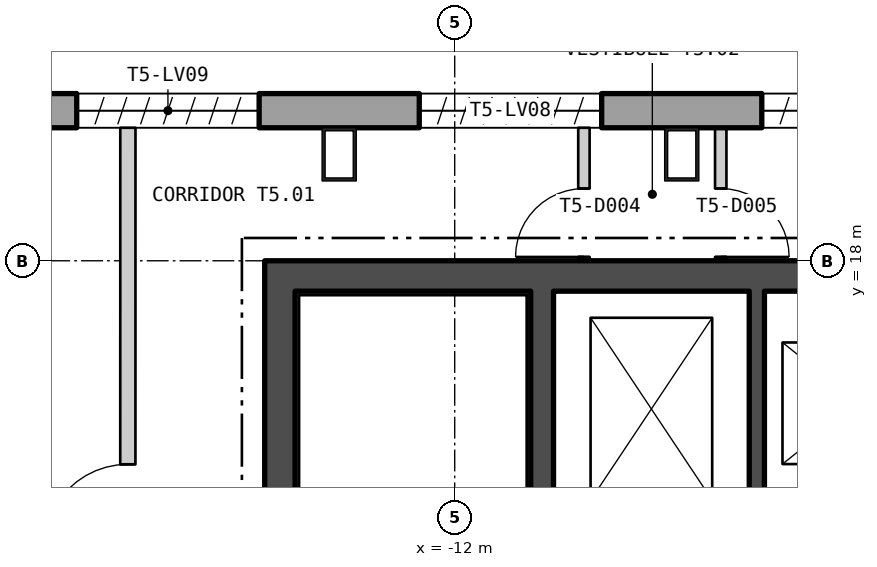
"""IFC4 building model, lengths in metres.
Left out: names, types, materials, properties, quantities, classifications, styles, units other than length and angle.
Written with IfcOpenShell. Run it as: python <this file> out.ifc"""

import sys

from ifc_helpers import new_model, si_unit, direction, frame, frame_2d, origin, origin_2d, place, context, subcontext, project, spatial, polyline, rectangle, hollow_rectangle, outline, extrude, element, fill, save


model = new_model("IFC4")
c1 = context("Model", 3, precision=1e-05, world=origin(), true_north=direction((0.0, 1.0)))
c2 = subcontext(c1, "Body", "Model", "MODEL_VIEW")
j1 = project(units=[si_unit("LENGTHUNIT", "METRE"), si_unit("PLANEANGLEUNIT", "RADIAN")], contexts=[c1])
p1 = place(None, origin())
s1 = spatial("IfcSite", under=j1, at=p1, CompositionType="ELEMENT")
p2 = place(p1, origin())
s2 = spatial("IfcBuilding", under=s1, at=p2, CompositionType="ELEMENT")
p3 = place(p2, frame((0.0, 0.0, 292.2)))
s3 = spatial("IfcBuildingStorey", under=s2, at=p3, CompositionType="ELEMENT", Elevation=292.2)
for number, where, z_axis, x_axis in (
    (1, (-9.013, 19.4, 0.0), (0.0, 0.0, 1.0), (-1.0, 0.0, 0.0)),
    (2, (-13.52, 19.4, 0.0), (0.0, 0.0, 1.0), (-1.0, 0.0, 0.0)),
):
    element("IfcColumn", number, at=place(p3, frame(where, z_axis=z_axis, x_axis=x_axis)), inside=s3, PredefinedType="COLUMN", context=c2, shape_type="SweptSolid", body=[
        extrude(hollow_rectangle(XDim=0.45, YDim=0.7, WallThickness=0.04, at=origin_2d()), origin(), (0.0, 0.0, 1.0), 6.0),
    ])
p4 = place(p3, frame((22.865, 19.975, -0.4), z_axis=(0.0, 0.0, 1.0), x_axis=(-1.0, 0.0, 0.0)))
e3 = element("IfcWall", 3, at=p4, inside=s3, PredefinedType="SOLIDWALL", context=c2, shape_type="SweptSolid", body=[
    extrude(outline(polyline([(-0.13, -0.225), (45.86, -0.225), (45.6, 0.225), (0.13, 0.225), (-0.13, -0.225)])), origin(), (0.0, 0.0, 1.0), 6.0),
])
p5 = place(p4, frame((1.424, 0.0, 1.6)))
e4 = element("IfcOpeningElement", 4, at=p5, cuts=e3, PredefinedType="OPENING", context=c2, shape_type="SweptSolid", body=[
    extrude(rectangle(XDim=2.4, YDim=3.6, at=frame_2d((1.2, 1.8))), frame((0.0, 0.235, 0.0), z_axis=(0.0, -1.0, 0.0), x_axis=(1.0, 0.0, 0.0)), (0.0, 0.0, 1.0), 0.47),
])
p6 = place(p4, frame((5.892, 0.0, 1.6)))
e5 = element("IfcOpeningElement", 5, at=p6, cuts=e3, PredefinedType="OPENING", context=c2, shape_type="SweptSolid", body=[
    extrude(rectangle(XDim=2.4, YDim=3.6, at=frame_2d((1.2, 1.8))), frame((0.0, 0.235, 0.0), z_axis=(0.0, -1.0, 0.0), x_axis=(1.0, 0.0, 0.0)), (0.0, 0.0, 1.0), 0.47),
])
p7 = place(p4, frame((10.399, 0.0, 1.6)))
e6 = element("IfcOpeningElement", 6, at=p7, cuts=e3, PredefinedType="OPENING", context=c2, shape_type="SweptSolid", body=[
    extrude(rectangle(XDim=2.4, YDim=3.6, at=frame_2d((1.2, 1.8))), frame((0.0, 0.235, 0.0), z_axis=(0.0, -1.0, 0.0), x_axis=(1.0, 0.0, 0.0)), (0.0, 0.0, 1.0), 0.47),
])
p8 = place(p4, frame((14.905, 0.0, 1.6)))
e7 = element("IfcOpeningElement", 7, at=p8, cuts=e3, PredefinedType="OPENING", context=c2, shape_type="SweptSolid", body=[
    extrude(rectangle(XDim=2.4, YDim=3.6, at=frame_2d((1.2, 1.8))), frame((0.0, 0.235, 0.0), z_axis=(0.0, -1.0, 0.0), x_axis=(1.0, 0.0, 0.0)), (0.0, 0.0, 1.0), 0.47),
])
p9 = place(p4, frame((19.412, 0.0, 1.6)))
e8 = element("IfcOpeningElement", 8, at=p9, cuts=e3, PredefinedType="OPENING", context=c2, shape_type="SweptSolid", body=[
    extrude(rectangle(XDim=2.4, YDim=3.6, at=frame_2d((1.2, 1.8))), frame((0.0, 0.235, 0.0), z_axis=(0.0, -1.0, 0.0), x_axis=(1.0, 0.0, 0.0)), (0.0, 0.0, 1.0), 0.47),
])
p10 = place(p4, frame((23.918, 0.0, 1.6)))
e9 = element("IfcOpeningElement", 9, at=p10, cuts=e3, PredefinedType="OPENING", context=c2, shape_type="SweptSolid", body=[
    extrude(rectangle(XDim=2.4, YDim=3.6, at=frame_2d((1.2, 1.8))), frame((0.0, 0.235, 0.0), z_axis=(0.0, -1.0, 0.0), x_axis=(1.0, 0.0, 0.0)), (0.0, 0.0, 1.0), 0.47),
])
p11 = place(p4, frame((28.425, 0.0, 1.6)))
e10 = element("IfcOpeningElement", 10, at=p11, cuts=e3, PredefinedType="OPENING", context=c2, shape_type="SweptSolid", body=[
    extrude(rectangle(XDim=2.4, YDim=3.6, at=frame_2d((1.2, 1.8))), frame((0.0, 0.235, 0.0), z_axis=(0.0, -1.0, 0.0), x_axis=(1.0, 0.0, 0.0)), (0.0, 0.0, 1.0), 0.47),
])
p12 = place(p4, frame((32.932, 0.0, 1.6)))
e11 = element("IfcOpeningElement", 11, at=p12, cuts=e3, PredefinedType="OPENING", context=c2, shape_type="SweptSolid", body=[
    extrude(rectangle(XDim=2.4, YDim=3.6, at=frame_2d((1.2, 1.8))), frame((0.0, 0.235, 0.0), z_axis=(0.0, -1.0, 0.0), x_axis=(1.0, 0.0, 0.0)), (0.0, 0.0, 1.0), 0.47),
])
p13 = place(p4, frame((37.438, 0.0, 1.6)))
e12 = element("IfcOpeningElement", 12, at=p13, cuts=e3, PredefinedType="OPENING", context=c2, shape_type="SweptSolid", body=[
    extrude(rectangle(XDim=2.4, YDim=3.6, at=frame_2d((1.2, 1.8))), frame((0.0, 0.235, 0.0), z_axis=(0.0, -1.0, 0.0), x_axis=(1.0, 0.0, 0.0)), (0.0, 0.0, 1.0), 0.47),
])
p14 = place(p4, frame((41.907, 0.0, 1.6)))
e13 = element("IfcOpeningElement", 13, at=p14, cuts=e3, PredefinedType="OPENING", context=c2, shape_type="SweptSolid", body=[
    extrude(rectangle(XDim=2.4, YDim=3.6, at=frame_2d((1.2, 1.8))), frame((0.0, 0.235, 0.0), z_axis=(0.0, -1.0, 0.0), x_axis=(1.0, 0.0, 0.0)), (0.0, 0.0, 1.0), 0.47),
])
p15 = place(p3, frame((-25.28, 15.792, -0.18), z_axis=(0.0, 0.0, 1.0), x_axis=(0.500000141277, -0.866025322218, 0.0)))
e14 = element("IfcWall", 14, at=p15, inside=s3, PredefinedType="SOLIDWALL", context=c2, shape_type="SweptSolid", body=[
    extrude(outline(polyline([(-0.13, -0.225), (45.86, -0.225), (45.6, 0.225), (0.13, 0.225), (-0.13, -0.225)])), origin(), (0.0, 0.0, 1.0), 5.9),
])
p16 = place(p15, frame((1.424, 0.0, 1.38)))
e15 = element("IfcOpeningElement", 15, at=p16, cuts=e14, PredefinedType="OPENING", context=c2, shape_type="SweptSolid", body=[
    extrude(rectangle(XDim=2.4, YDim=3.6, at=frame_2d((1.2, 1.8))), frame((0.0, 0.235, 0.0), z_axis=(0.0, -1.0, 0.0), x_axis=(1.0, 0.0, 0.0)), (0.0, 0.0, 1.0), 0.47),
])
p17 = place(p15, frame((5.892, 0.0, 1.38)))
e16 = element("IfcOpeningElement", 16, at=p17, cuts=e14, PredefinedType="OPENING", context=c2, shape_type="SweptSolid", body=[
    extrude(rectangle(XDim=2.4, YDim=3.6, at=frame_2d((1.2, 1.8))), frame((0.0, 0.235, 0.0), z_axis=(0.0, -1.0, 0.0), x_axis=(1.0, 0.0, 0.0)), (0.0, 0.0, 1.0), 0.47),
])
p18 = place(p15, frame((10.399, 0.0, 1.38)))
e17 = element("IfcOpeningElement", 17, at=p18, cuts=e14, PredefinedType="OPENING", context=c2, shape_type="SweptSolid", body=[
    extrude(rectangle(XDim=2.4, YDim=3.6, at=frame_2d((1.2, 1.8))), frame((0.0, 0.235, 0.0), z_axis=(0.0, -1.0, 0.0), x_axis=(1.0, 0.0, 0.0)), (0.0, 0.0, 1.0), 0.47),
])
p19 = place(p15, frame((14.905, 0.0, 1.38)))
e18 = element("IfcOpeningElement", 18, at=p19, cuts=e14, PredefinedType="OPENING", context=c2, shape_type="SweptSolid", body=[
    extrude(rectangle(XDim=2.4, YDim=3.6, at=frame_2d((1.2, 1.8))), frame((0.0, 0.235, 0.0), z_axis=(0.0, -1.0, 0.0), x_axis=(1.0, 0.0, 0.0)), (0.0, 0.0, 1.0), 0.47),
])
p20 = place(p15, frame((19.412, 0.0, 1.38)))
e19 = element("IfcOpeningElement", 19, at=p20, cuts=e14, PredefinedType="OPENING", context=c2, shape_type="SweptSolid", body=[
    extrude(rectangle(XDim=2.4, YDim=3.6, at=frame_2d((1.2, 1.8))), frame((0.0, 0.235, 0.0), z_axis=(0.0, -1.0, 0.0), x_axis=(1.0, 0.0, 0.0)), (0.0, 0.0, 1.0), 0.47),
])
p21 = place(p15, frame((23.918, 0.0, 1.38)))
e20 = element("IfcOpeningElement", 20, at=p21, cuts=e14, PredefinedType="OPENING", context=c2, shape_type="SweptSolid", body=[
    extrude(rectangle(XDim=2.4, YDim=3.6, at=frame_2d((1.2, 1.8))), frame((0.0, 0.235, 0.0), z_axis=(0.0, -1.0, 0.0), x_axis=(1.0, 0.0, 0.0)), (0.0, 0.0, 1.0), 0.47),
])
p22 = place(p15, frame((28.425, 0.0, 1.38)))
e21 = element("IfcOpeningElement", 21, at=p22, cuts=e14, PredefinedType="OPENING", context=c2, shape_type="SweptSolid", body=[
    extrude(rectangle(XDim=2.4, YDim=3.6, at=frame_2d((1.2, 1.8))), frame((0.0, 0.235, 0.0), z_axis=(0.0, -1.0, 0.0), x_axis=(1.0, 0.0, 0.0)), (0.0, 0.0, 1.0), 0.47),
])
p23 = place(p15, frame((32.932, 0.0, 1.38)))
e22 = element("IfcOpeningElement", 22, at=p23, cuts=e14, PredefinedType="OPENING", context=c2, shape_type="SweptSolid", body=[
    extrude(rectangle(XDim=2.4, YDim=3.6, at=frame_2d((1.2, 1.8))), frame((0.0, 0.235, 0.0), z_axis=(0.0, -1.0, 0.0), x_axis=(1.0, 0.0, 0.0)), (0.0, 0.0, 1.0), 0.47),
])
p24 = place(p15, frame((37.438, 0.0, 1.38)))
e23 = element("IfcOpeningElement", 23, at=p24, cuts=e14, PredefinedType="OPENING", context=c2, shape_type="SweptSolid", body=[
    extrude(rectangle(XDim=2.4, YDim=3.6, at=frame_2d((1.2, 1.8))), frame((0.0, 0.235, 0.0), z_axis=(0.0, -1.0, 0.0), x_axis=(1.0, 0.0, 0.0)), (0.0, 0.0, 1.0), 0.47),
])
p25 = place(p15, frame((41.907, 0.0, 1.38)))
e24 = element("IfcOpeningElement", 24, at=p25, cuts=e14, PredefinedType="OPENING", context=c2, shape_type="SweptSolid", body=[
    extrude(rectangle(XDim=2.4, YDim=3.6, at=frame_2d((1.2, 1.8))), frame((0.0, 0.235, 0.0), z_axis=(0.0, -1.0, 0.0), x_axis=(1.0, 0.0, 0.0)), (0.0, 0.0, 1.0), 0.47),
])
p26 = place(p3, frame((-14.5, 17.8, 0.0), z_axis=(0.0, 0.0, 1.0), x_axis=(1.0, 0.0, 0.0)))
e25 = element("IfcWall", 25, at=p26, inside=s3, PredefinedType="SHEAR", context=c2, shape_type="SweptSolid", body=[
    extrude(rectangle(XDim=29.0, YDim=0.4, at=frame_2d((14.5, 0.0))), origin(), (0.0, 0.0, 1.0), 5.7),
])
p27 = place(p3, frame((-14.3, 4.4, 0.0), z_axis=(0.0, 0.0, 1.0), x_axis=(0.0, 1.0, 0.0)))
e26 = element("IfcWall", 26, at=p27, inside=s3, PredefinedType="SHEAR", context=c2, shape_type="SweptSolid", body=[
    extrude(rectangle(XDim=13.2, YDim=0.4, at=frame_2d((6.6, 0.0))), origin(), (0.0, 0.0, 1.0), 5.7),
])
p28 = place(p27, frame((3.05, 0.0, 0.0)))
e27 = element("IfcOpeningElement", 27, at=p28, cuts=e26, PredefinedType="OPENING", context=c2, shape_type="SweptSolid", body=[
    extrude(rectangle(XDim=1.5, YDim=2.1, at=frame_2d((0.75, 1.05))), frame((0.0, 0.21, 0.0), z_axis=(0.0, -1.0, 0.0), x_axis=(1.0, 0.0, 0.0)), (0.0, 0.0, 1.0), 0.42),
])
p29 = place(p3, frame((-10.85, 4.4, 0.0), z_axis=(0.0, 0.0, 1.0), x_axis=(0.0, 1.0, 0.0)))
e28 = element("IfcWall", 28, at=p29, inside=s3, PredefinedType="SHEAR", context=c2, shape_type="SweptSolid", body=[
    extrude(rectangle(XDim=13.2, YDim=0.3, at=frame_2d((6.6, 0.0))), origin(), (0.0, 0.0, 1.0), 5.7),
])
p30 = place(p29, frame((1.575, 0.0, 0.0)))
e29 = element("IfcOpeningElement", 29, at=p30, cuts=e28, PredefinedType="OPENING", context=c2, shape_type="SweptSolid", body=[
    extrude(rectangle(XDim=1.25, YDim=2.1, at=frame_2d((0.625, 1.05))), frame((0.0, 0.16, 0.0), z_axis=(0.0, -1.0, 0.0), x_axis=(1.0, 0.0, 0.0)), (0.0, 0.0, 1.0), 0.32),
])
p31 = place(p29, frame((0.4, 0.0, 0.0)))
e30 = element("IfcOpeningElement", 30, at=p31, cuts=e28, PredefinedType="OPENING", context=c2, shape_type="SweptSolid", body=[
    extrude(rectangle(XDim=0.9, YDim=2.1, at=frame_2d((0.45, 1.05))), frame((0.0, 0.16, 0.0), z_axis=(0.0, -1.0, 0.0), x_axis=(1.0, 0.0, 0.0)), (0.0, 0.0, 1.0), 0.32),
])
p32 = place(p3, frame((-8.025, 14.7, 0.0), z_axis=(0.0, 0.0, 1.0), x_axis=(0.0, 1.0, 0.0)))
e31 = element("IfcWall", 31, at=p32, inside=s3, PredefinedType="SHEAR", context=c2, shape_type="SweptSolid", body=[
    extrude(rectangle(XDim=2.9, YDim=0.2, at=frame_2d((1.45, 0.0))), origin(), (0.0, 0.0, 1.0), 5.7),
])
p33 = place(p3, frame((-16.301, 13.395, 0.0), z_axis=(0.0, 0.0, 1.0), x_axis=(0.00015735641, 0.999999987619, 0.0)))
e32 = element("IfcWall", 32, at=p33, inside=s3, PredefinedType="PARTITIONING", context=c2, shape_type="SweptSolid", body=[
    extrude(rectangle(XDim=6.355, YDim=0.2, at=frame_2d((3.178, 0.0))), origin(), (0.0, 0.0, 1.0), 5.7),
])
p34 = place(p33, frame((0.827, 0.0, 0.0)))
e33 = element("IfcOpeningElement", 33, at=p34, cuts=e32, PredefinedType="OPENING", context=c2, shape_type="SweptSolid", body=[
    extrude(rectangle(XDim=1.1, YDim=2.1, at=frame_2d((0.55, 1.05))), frame((0.0, 0.11, 0.0), z_axis=(0.0, -1.0, 0.0), x_axis=(1.0, 0.0, 0.0)), (0.0, 0.0, 1.0), 0.22),
])
p35 = place(p3, frame((-10.3, 18.0, 0.0), z_axis=(0.0, 0.0, 1.0), x_axis=(0.0, 1.0, 0.0)))
e34 = element("IfcWall", 34, at=p35, inside=s3, PredefinedType="PARTITIONING", context=c2, shape_type="SweptSolid", body=[
    extrude(rectangle(XDim=1.75, YDim=0.15, at=frame_2d((0.875, 0.0))), origin(), (0.0, 0.0, 1.0), 5.7),
])
p36 = place(p35, frame((0.05, 0.0, 0.0)))
e35 = element("IfcOpeningElement", 35, at=p36, cuts=e34, PredefinedType="OPENING", context=c2, shape_type="SweptSolid", body=[
    extrude(rectangle(XDim=0.9, YDim=2.1, at=frame_2d((0.45, 1.05))), frame((0.0, 0.085, 0.0), z_axis=(0.0, -1.0, 0.0), x_axis=(1.0, 0.0, 0.0)), (0.0, 0.0, 1.0), 0.17),
])
p37 = place(p3, frame((-8.5, 18.0, 0.0), z_axis=(0.0, 0.0, 1.0), x_axis=(0.0, 1.0, 0.0)))
e36 = element("IfcWall", 36, at=p37, inside=s3, PredefinedType="PARTITIONING", context=c2, shape_type="SweptSolid", body=[
    extrude(rectangle(XDim=1.75, YDim=0.15, at=frame_2d((0.875, 0.0))), origin(), (0.0, 0.0, 1.0), 5.7),
])
p38 = place(p37, frame((0.05, 0.0, 0.0)))
e37 = element("IfcOpeningElement", 37, at=p38, cuts=e36, PredefinedType="OPENING", context=c2, shape_type="SweptSolid", body=[
    extrude(rectangle(XDim=0.9, YDim=2.1, at=frame_2d((0.45, 1.05))), frame((0.0, 0.085, 0.0), z_axis=(0.0, -1.0, 0.0), x_axis=(1.0, 0.0, 0.0)), (0.0, 0.0, 1.0), 0.17),
])
p39 = place(p34, origin())
e38 = element("IfcDoor", 38, at=p39, inside=s3, OperationType="SINGLE_SWING_RIGHT", PredefinedType="DOOR", context=c2, shape_type="SweptSolid", body=[
    extrude(rectangle(XDim=1.1, YDim=2.1, at=frame_2d((0.55, 1.05))), frame((0.0, 0.025, 0.0), z_axis=(0.0, -1.0, 0.0), x_axis=(1.0, 0.0, 0.0)), (0.0, 0.0, 1.0), 0.05),
])
fill(e33, e38)
p40 = place(p36, origin())
e39 = element("IfcDoor", 39, at=p40, inside=s3, OperationType="SINGLE_SWING_RIGHT", PredefinedType="DOOR", context=c2, shape_type="SweptSolid", body=[
    extrude(rectangle(XDim=0.9, YDim=2.1, at=frame_2d((0.45, 1.05))), frame((0.0, 0.025, 0.0), z_axis=(0.0, -1.0, 0.0), x_axis=(1.0, 0.0, 0.0)), (0.0, 0.0, 1.0), 0.05),
])
fill(e35, e39)
p41 = place(p38, origin())
e40 = element("IfcDoor", 40, at=p41, inside=s3, OperationType="SINGLE_SWING_LEFT", PredefinedType="DOOR", context=c2, shape_type="SweptSolid", body=[
    extrude(rectangle(XDim=0.9, YDim=2.1, at=frame_2d((0.45, 1.05))), frame((0.0, 0.025, 0.0), z_axis=(0.0, -1.0, 0.0), x_axis=(1.0, 0.0, 0.0)), (0.0, 0.0, 1.0), 0.05),
])
fill(e37, e40)
save(model, sys.argv[1])
